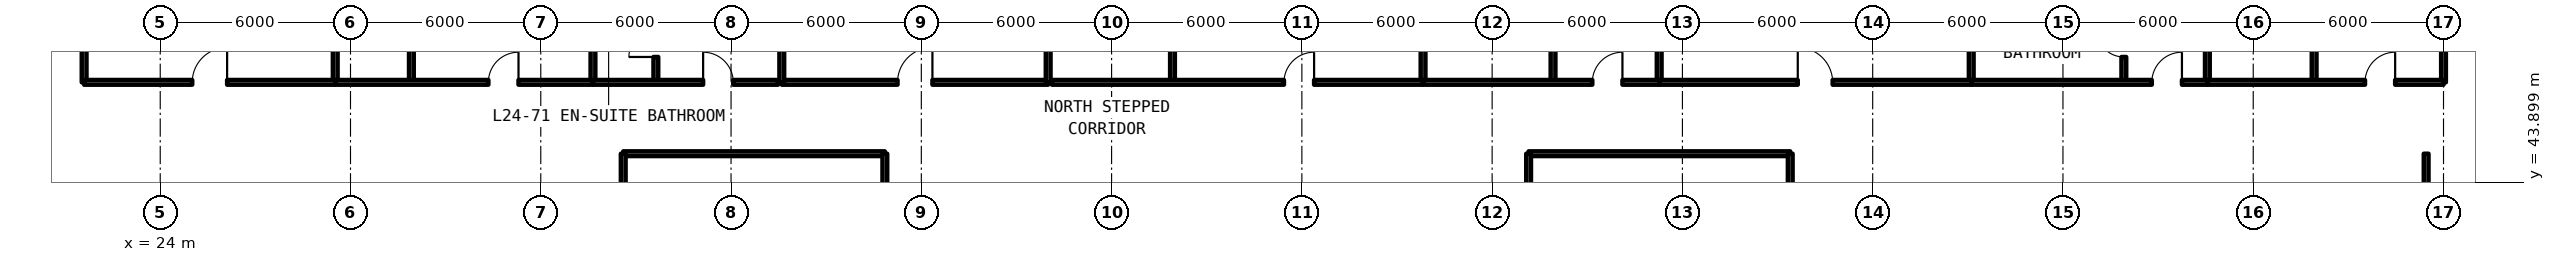
"""IFC4 building model, lengths in metres.
Left out: names, types, materials, properties, quantities, classifications, styles, units other than length and angle.
Written with IfcOpenShell. Run it as: python <this file> out.ifc"""

import sys

from ifc_helpers import new_model, si_unit, direction, frame, frame_2d, origin, place, context, subcontext, project, spatial, rectangle, extrude, element, fill, save


model = new_model("IFC4")
c1 = context("Model", 3, precision=1e-05, world=origin(), true_north=direction((0.0, 1.0)))
c2 = subcontext(c1, "Body", "Model", "MODEL_VIEW")
j1 = project(units=[si_unit("LENGTHUNIT", "METRE"), si_unit("PLANEANGLEUNIT", "RADIAN")], contexts=[c1])
p1 = place(None, origin())
s1 = spatial("IfcSite", under=j1, at=p1, CompositionType="ELEMENT")
p2 = place(p1, origin())
s2 = spatial("IfcBuilding", under=s1, at=p2, CompositionType="ELEMENT")
p3 = place(p2, frame((0.0, 0.0, 88.77)))
s3 = spatial("IfcBuildingStorey", under=s2, at=p3, CompositionType="ELEMENT", Elevation=88.77)
p4 = place(p3, frame((38.6, 44.8, 0.0), z_axis=(0.0, 0.0, 1.0), x_axis=(1.0, 0.0, 0.0)))
e1 = element("IfcWall", 1, at=p4, inside=s3, PredefinedType="SOLIDWALL", context=c2, shape_type="SweptSolid", body=[
    extrude(rectangle(XDim=8.25, YDim=0.15, at=frame_2d((4.125, 0.0))), origin(), (0.0, 0.0, 1.0), 2.35),
])
p5 = place(p3, frame((38.6, 22.4, 0.0), z_axis=(0.0, 0.0, 1.0), x_axis=(0.0, 1.0, 0.0)))
e2 = element("IfcWall", 2, at=p5, inside=s3, PredefinedType="SOLIDWALL", context=c2, shape_type="SweptSolid", body=[
    extrude(rectangle(XDim=22.4, YDim=0.15, at=frame_2d((11.2, 0.0))), origin(), (0.0, 0.0, 1.0), 2.35),
])
p6 = place(p5, frame((8.025, 0.0, 0.0)))
e3 = element("IfcOpeningElement", 3, at=p6, cuts=e2, PredefinedType="OPENING", context=c2, shape_type="SweptSolid", body=[
    extrude(rectangle(XDim=0.95, YDim=2.15, at=frame_2d((0.475, 1.075))), frame((0.0, 0.085, 0.0), z_axis=(0.0, -1.0, 0.0), x_axis=(1.0, 0.0, 0.0)), (0.0, 0.0, 1.0), 0.17),
])
p7 = place(p3, frame((46.85, 22.4, 0.0), z_axis=(0.0, 0.0, 1.0), x_axis=(0.0, 1.0, 0.0)))
e4 = element("IfcWall", 4, at=p7, inside=s3, PredefinedType="SOLIDWALL", context=c2, shape_type="SweptSolid", body=[
    extrude(rectangle(XDim=22.4, YDim=0.15, at=frame_2d((11.2, 0.0))), origin(), (0.0, 0.0, 1.0), 2.35),
])
p8 = place(p3, frame((67.15, 44.8, 0.0), z_axis=(0.0, 0.0, 1.0), x_axis=(1.0, 0.0, 0.0)))
e5 = element("IfcWall", 5, at=p8, inside=s3, PredefinedType="SOLIDWALL", context=c2, shape_type="SweptSolid", body=[
    extrude(rectangle(XDim=8.25, YDim=0.15, at=frame_2d((4.125, 0.0))), origin(), (0.0, 0.0, 1.0), 2.35),
])
p9 = place(p3, frame((67.15, 22.4, 0.0), z_axis=(0.0, 0.0, 1.0), x_axis=(0.0, 1.0, 0.0)))
e6 = element("IfcWall", 6, at=p9, inside=s3, PredefinedType="SOLIDWALL", context=c2, shape_type="SweptSolid", body=[
    extrude(rectangle(XDim=22.4, YDim=0.15, at=frame_2d((11.2, 0.0))), origin(), (0.0, 0.0, 1.0), 2.35),
])
p10 = place(p3, frame((75.4, 22.4, 0.0), z_axis=(0.0, 0.0, 1.0), x_axis=(0.0, 1.0, 0.0)))
e7 = element("IfcWall", 7, at=p10, inside=s3, PredefinedType="SOLIDWALL", context=c2, shape_type="SweptSolid", body=[
    extrude(rectangle(XDim=22.4, YDim=0.15, at=frame_2d((11.2, 0.0))), origin(), (0.0, 0.0, 1.0), 2.35),
])
p11 = place(p10, frame((8.025, 0.0, 0.0)))
e8 = element("IfcOpeningElement", 8, at=p11, cuts=e7, PredefinedType="OPENING", context=c2, shape_type="SweptSolid", body=[
    extrude(rectangle(XDim=0.95, YDim=2.15, at=frame_2d((0.475, 1.075))), frame((0.0, 0.085, 0.0), z_axis=(0.0, -1.0, 0.0), x_axis=(1.0, 0.0, 0.0)), (0.0, 0.0, 1.0), 0.17),
])
p12 = place(p3, frame((95.452, 39.6, 0.0), z_axis=(0.0, 0.0, 1.0), x_axis=(0.0, 1.0, 0.0)))
e9 = element("IfcWall", 9, at=p12, inside=s3, PredefinedType="PARTITIONING", context=c2, shape_type="SweptSolid", body=[
    extrude(rectangle(XDim=5.2, YDim=0.15, at=frame_2d((2.6, 0.0))), origin(), (0.0, 0.0, 1.0), 2.35),
])
p13 = place(p3, frame((43.6, 47.05, 0.0), z_axis=(0.0, 0.0, 1.0), x_axis=(1.0, 0.0, 0.0)))
e10 = element("IfcWall", 10, at=p13, inside=s3, PredefinedType="SOLIDWALL", context=c2, shape_type="SweptSolid", body=[
    extrude(rectangle(XDim=8.4, YDim=0.15, at=frame_2d((4.2, 0.0))), origin(), (0.0, 0.0, 1.0), 2.35),
])
p14 = place(p13, frame((3.65, 0.0, 0.0)))
e11 = element("IfcOpeningElement", 11, at=p14, cuts=e10, PredefinedType="OPENING", context=c2, shape_type="SweptSolid", body=[
    extrude(rectangle(XDim=1.1, YDim=2.15, at=frame_2d((0.55, 1.075))), frame((0.0, 0.085, 0.0), z_axis=(0.0, -1.0, 0.0), x_axis=(1.0, 0.0, 0.0)), (0.0, 0.0, 1.0), 0.17),
])
for number, where, z_axis, x_axis in (
    (12, (43.6, 47.05, 0.0), (0.0, 0.0, 1.0), (0.0, 1.0, 0.0)),
    (13, (52.0, 47.05, 0.0), (0.0, 0.0, 1.0), (0.0, 1.0, 0.0)),
    (14, (21.6, 47.05, 0.0), (0.0, 0.0, 1.0), (0.0, 1.0, 0.0)),
    (15, (29.519, 47.05, 0.0), (0.0, 0.0, 1.0), (0.0, 1.0, 0.0)),
):
    element("IfcWall", number, at=place(p3, frame(where, z_axis=z_axis, x_axis=x_axis)), inside=s3, PredefinedType="SOLIDWALL", context=c2, shape_type="SweptSolid", body=[
        extrude(rectangle(XDim=10.3, YDim=0.15, at=frame_2d((5.15, 0.0))), origin(), (0.0, 0.0, 1.0), 2.35),
    ])
p15 = place(p3, frame((21.6, 47.05, 0.0), z_axis=(0.0, 0.0, 1.0), x_axis=(1.0, 0.0, 0.0)))
e16 = element("IfcWall", 16, at=p15, inside=s3, PredefinedType="SOLIDWALL", context=c2, shape_type="SweptSolid", body=[
    extrude(rectangle(XDim=7.918, YDim=0.15, at=frame_2d((3.959, 0.0))), origin(), (0.0, 0.0, 1.0), 2.35),
])
p16 = place(p15, frame((3.409, 0.0, 0.0)))
e17 = element("IfcOpeningElement", 17, at=p16, cuts=e16, PredefinedType="OPENING", context=c2, shape_type="SweptSolid", body=[
    extrude(rectangle(XDim=1.1, YDim=2.15, at=frame_2d((0.55, 1.075))), frame((0.0, 0.085, 0.0), z_axis=(0.0, -1.0, 0.0), x_axis=(1.0, 0.0, 0.0)), (0.0, 0.0, 1.0), 0.17),
])
p17 = place(p3, frame((37.646, 47.05, 0.0), z_axis=(0.0, 0.0, 1.0), x_axis=(0.0, 1.0, 0.0)))
e18 = element("IfcWall", 18, at=p17, inside=s3, PredefinedType="SOLIDWALL", context=c2, shape_type="SweptSolid", body=[
    extrude(rectangle(XDim=10.3, YDim=0.15, at=frame_2d((5.15, 0.0))), origin(), (0.0, 0.0, 1.0), 2.35),
])
p18 = place(p3, frame((31.92, 47.05, 0.0), z_axis=(0.0, 0.0, 1.0), x_axis=(0.0, 1.0, 0.0)))
e19 = element("IfcWall", 19, at=p18, inside=s3, PredefinedType="PARTITIONING", context=c2, shape_type="SweptSolid", body=[
    extrude(rectangle(XDim=6.67, YDim=0.15, at=frame_2d((3.335, 0.0))), origin(), (0.0, 0.0, 1.0), 2.35),
])
p19 = place(p18, frame((1.543, 0.0, 0.0)))
e20 = element("IfcOpeningElement", 20, at=p19, cuts=e19, PredefinedType="OPENING", context=c2, shape_type="SweptSolid", body=[
    extrude(rectangle(XDim=0.85, YDim=2.1, at=frame_2d((0.425, 1.05))), frame((0.0, 0.085, 0.0), z_axis=(0.0, -1.0, 0.0), x_axis=(1.0, 0.0, 0.0)), (0.0, 0.0, 1.0), 0.17),
])
p20 = place(p18, frame((4.878, 0.0, 0.0)))
e21 = element("IfcOpeningElement", 21, at=p20, cuts=e19, PredefinedType="OPENING", context=c2, shape_type="SweptSolid", body=[
    extrude(rectangle(XDim=0.85, YDim=2.1, at=frame_2d((0.425, 1.05))), frame((0.0, 0.085, 0.0), z_axis=(0.0, -1.0, 0.0), x_axis=(1.0, 0.0, 0.0)), (0.0, 0.0, 1.0), 0.17),
])
p21 = place(p3, frame((29.519, 47.05, 0.0), z_axis=(0.0, 0.0, 1.0), x_axis=(1.0, 0.0, 0.0)))
e22 = element("IfcWall", 22, at=p21, inside=s3, PredefinedType="SOLIDWALL", context=c2, shape_type="SweptSolid", body=[
    extrude(rectangle(XDim=8.127, YDim=0.15, at=frame_2d((4.063, 0.0))), origin(), (0.0, 0.0, 1.0), 2.35),
])
p22 = place(p21, frame((4.829, 0.0, 0.0)))
e23 = element("IfcOpeningElement", 23, at=p22, cuts=e22, PredefinedType="OPENING", context=c2, shape_type="SweptSolid", body=[
    extrude(rectangle(XDim=0.95, YDim=2.15, at=frame_2d((0.475, 1.075))), frame((0.0, 0.085, 0.0), z_axis=(0.0, -1.0, 0.0), x_axis=(1.0, 0.0, 0.0)), (0.0, 0.0, 1.0), 0.17),
])
p23 = place(p3, frame((39.629, 47.05, 0.0), z_axis=(0.0, 0.0, 1.0), x_axis=(0.0, 1.0, 0.0)))
e24 = element("IfcWall", 24, at=p23, inside=s3, PredefinedType="PARTITIONING", context=c2, shape_type="SweptSolid", body=[
    extrude(rectangle(XDim=10.3, YDim=0.15, at=frame_2d((5.15, 0.0))), origin(), (0.0, 0.0, 1.0), 2.35),
])
p24 = place(p23, frame((0.8, 0.0, 0.0)))
e25 = element("IfcOpeningElement", 25, at=p24, cuts=e24, PredefinedType="OPENING", context=c2, shape_type="SweptSolid", body=[
    extrude(rectangle(XDim=0.85, YDim=2.1, at=frame_2d((0.425, 1.05))), frame((0.0, 0.085, 0.0), z_axis=(0.0, -1.0, 0.0), x_axis=(1.0, 0.0, 0.0)), (0.0, 0.0, 1.0), 0.17),
])
p25 = place(p23, frame((5.25, 0.0, 0.0)))
e26 = element("IfcOpeningElement", 26, at=p25, cuts=e24, PredefinedType="OPENING", context=c2, shape_type="SweptSolid", body=[
    extrude(rectangle(XDim=0.85, YDim=2.1, at=frame_2d((0.425, 1.05))), frame((0.0, 0.085, 0.0), z_axis=(0.0, -1.0, 0.0), x_axis=(1.0, 0.0, 0.0)), (0.0, 0.0, 1.0), 0.17),
])
p26 = place(p3, frame((37.646, 47.05, 0.0), z_axis=(0.0, 0.0, 1.0), x_axis=(1.0, 0.0, 0.0)))
e27 = element("IfcWall", 27, at=p26, inside=s3, PredefinedType="SOLIDWALL", context=c2, shape_type="SweptSolid", body=[
    extrude(rectangle(XDim=5.834, YDim=0.15, at=frame_2d((2.917, 0.0))), origin(), (0.0, 0.0, 1.0), 2.35),
])
p27 = place(p26, frame((3.474, 0.0, 0.0)))
e28 = element("IfcOpeningElement", 28, at=p27, cuts=e27, PredefinedType="OPENING", context=c2, shape_type="SweptSolid", body=[
    extrude(rectangle(XDim=0.95, YDim=2.15, at=frame_2d((0.475, 1.075))), frame((0.0, 0.085, 0.0), z_axis=(0.0, -1.0, 0.0), x_axis=(1.0, 0.0, 0.0)), (0.0, 0.0, 1.0), 0.17),
])
for number, where, z_axis, x_axis in (
    (29, (96.0, 47.05, 0.0), (0.0, 0.0, 1.0), (0.0, 1.0, 0.0)),
    (30, (63.821, 47.05, 0.0), (0.0, 0.0, 1.0), (0.0, 1.0, 0.0)),
):
    element("IfcWall", number, at=place(p3, frame(where, z_axis=z_axis, x_axis=x_axis)), inside=s3, PredefinedType="SOLIDWALL", context=c2, shape_type="SweptSolid", body=[
        extrude(rectangle(XDim=10.3, YDim=0.15, at=frame_2d((5.15, 0.0))), origin(), (0.0, 0.0, 1.0), 2.35),
    ])
p28 = place(p3, frame((55.92, 47.05, 0.0), z_axis=(0.0, 0.0, 1.0), x_axis=(0.0, 1.0, 0.0)))
e31 = element("IfcWall", 31, at=p28, inside=s3, PredefinedType="PARTITIONING", context=c2, shape_type="SweptSolid", body=[
    extrude(rectangle(XDim=5.452, YDim=0.15, at=frame_2d((2.726, 0.0))), origin(), (0.0, 0.0, 1.0), 2.35),
])
p29 = place(p28, frame((1.183, 0.0, 0.0)))
e32 = element("IfcOpeningElement", 32, at=p29, cuts=e31, PredefinedType="OPENING", context=c2, shape_type="SweptSolid", body=[
    extrude(rectangle(XDim=0.85, YDim=2.1, at=frame_2d((0.425, 1.05))), frame((0.0, 0.085, 0.0), z_axis=(0.0, -1.0, 0.0), x_axis=(1.0, 0.0, 0.0)), (0.0, 0.0, 1.0), 0.17),
])
p30 = place(p28, frame((3.909, 0.0, 0.0)))
e33 = element("IfcOpeningElement", 33, at=p30, cuts=e31, PredefinedType="OPENING", context=c2, shape_type="SweptSolid", body=[
    extrude(rectangle(XDim=0.85, YDim=2.1, at=frame_2d((0.425, 1.05))), frame((0.0, 0.085, 0.0), z_axis=(0.0, -1.0, 0.0), x_axis=(1.0, 0.0, 0.0)), (0.0, 0.0, 1.0), 0.17),
])
p31 = place(p3, frame((52.12, 47.05, 0.0), z_axis=(0.0, 0.0, 1.0), x_axis=(1.0, 0.0, 0.0)))
e34 = element("IfcWall", 34, at=p31, inside=s3, PredefinedType="SOLIDWALL", context=c2, shape_type="SweptSolid", body=[
    extrude(rectangle(XDim=11.701, YDim=0.15, at=frame_2d((5.851, 0.0))), origin(), (0.0, 0.0, 1.0), 2.35),
])
p32 = place(p31, frame((7.316, 0.0, 0.0)))
e35 = element("IfcOpeningElement", 35, at=p32, cuts=e34, PredefinedType="OPENING", context=c2, shape_type="SweptSolid", body=[
    extrude(rectangle(XDim=0.95, YDim=2.15, at=frame_2d((0.475, 1.075))), frame((0.0, 0.085, 0.0), z_axis=(0.0, -1.0, 0.0), x_axis=(1.0, 0.0, 0.0)), (0.0, 0.0, 1.0), 0.17),
])
p33 = place(p3, frame((71.268, 47.05, 0.0), z_axis=(0.0, 0.0, 1.0), x_axis=(0.0, 1.0, 0.0)))
e36 = element("IfcWall", 36, at=p33, inside=s3, PredefinedType="SOLIDWALL", context=c2, shape_type="SweptSolid", body=[
    extrude(rectangle(XDim=10.3, YDim=0.15, at=frame_2d((5.15, 0.0))), origin(), (0.0, 0.0, 1.0), 2.35),
])
p34 = place(p3, frame((67.92, 47.05, 0.0), z_axis=(0.0, 0.0, 1.0), x_axis=(0.0, 1.0, 0.0)))
e37 = element("IfcWall", 37, at=p34, inside=s3, PredefinedType="PARTITIONING", context=c2, shape_type="SweptSolid", body=[
    extrude(rectangle(XDim=6.338, YDim=0.15, at=frame_2d((3.169, 0.0))), origin(), (0.0, 0.0, 1.0), 2.35),
])
p35 = place(p34, frame((1.445, 0.0, 0.0)))
e38 = element("IfcOpeningElement", 38, at=p35, cuts=e37, PredefinedType="OPENING", context=c2, shape_type="SweptSolid", body=[
    extrude(rectangle(XDim=0.85, YDim=2.1, at=frame_2d((0.425, 1.05))), frame((0.0, 0.085, 0.0), z_axis=(0.0, -1.0, 0.0), x_axis=(1.0, 0.0, 0.0)), (0.0, 0.0, 1.0), 0.17),
])
p36 = place(p34, frame((4.614, 0.0, 0.0)))
e39 = element("IfcOpeningElement", 39, at=p36, cuts=e37, PredefinedType="OPENING", context=c2, shape_type="SweptSolid", body=[
    extrude(rectangle(XDim=0.85, YDim=2.1, at=frame_2d((0.425, 1.05))), frame((0.0, 0.085, 0.0), z_axis=(0.0, -1.0, 0.0), x_axis=(1.0, 0.0, 0.0)), (0.0, 0.0, 1.0), 0.17),
])
p37 = place(p3, frame((63.821, 47.05, 0.0), z_axis=(0.0, 0.0, 1.0), x_axis=(1.0, 0.0, 0.0)))
e40 = element("IfcWall", 40, at=p37, inside=s3, PredefinedType="SOLIDWALL", context=c2, shape_type="SweptSolid", body=[
    extrude(rectangle(XDim=7.446, YDim=0.15, at=frame_2d((3.723, 0.0))), origin(), (0.0, 0.0, 1.0), 2.35),
])
p38 = place(p37, frame((5.337, 0.0, 0.0)))
e41 = element("IfcOpeningElement", 41, at=p38, cuts=e40, PredefinedType="OPENING", context=c2, shape_type="SweptSolid", body=[
    extrude(rectangle(XDim=0.95, YDim=2.15, at=frame_2d((0.475, 1.075))), frame((0.0, 0.085, 0.0), z_axis=(0.0, -1.0, 0.0), x_axis=(1.0, 0.0, 0.0)), (0.0, 0.0, 1.0), 0.17),
])
p39 = place(p3, frame((81.107, 47.05, 0.0), z_axis=(0.0, 0.0, 1.0), x_axis=(0.0, 1.0, 0.0)))
e42 = element("IfcWall", 42, at=p39, inside=s3, PredefinedType="SOLIDWALL", context=c2, shape_type="SweptSolid", body=[
    extrude(rectangle(XDim=10.3, YDim=0.15, at=frame_2d((5.15, 0.0))), origin(), (0.0, 0.0, 1.0), 2.35),
])
p40 = place(p3, frame((71.268, 47.05, 0.0), z_axis=(0.0, 0.0, 1.0), x_axis=(1.0, 0.0, 0.0)))
e43 = element("IfcWall", 43, at=p40, inside=s3, PredefinedType="SOLIDWALL", context=c2, shape_type="SweptSolid", body=[
    extrude(rectangle(XDim=9.84, YDim=0.15, at=frame_2d((4.92, 0.0))), origin(), (0.0, 0.0, 1.0), 2.35),
])
p41 = place(p40, frame((4.37, 0.0, 0.0)))
e44 = element("IfcOpeningElement", 44, at=p41, cuts=e43, PredefinedType="OPENING", context=c2, shape_type="SweptSolid", body=[
    extrude(rectangle(XDim=1.1, YDim=2.15, at=frame_2d((0.55, 1.075))), frame((0.0, 0.085, 0.0), z_axis=(0.0, -1.0, 0.0), x_axis=(1.0, 0.0, 0.0)), (0.0, 0.0, 1.0), 0.17),
])
p42 = place(p3, frame((88.554, 47.05, 0.0), z_axis=(0.0, 0.0, 1.0), x_axis=(0.0, 1.0, 0.0)))
e45 = element("IfcWall", 45, at=p42, inside=s3, PredefinedType="SOLIDWALL", context=c2, shape_type="SweptSolid", body=[
    extrude(rectangle(XDim=10.3, YDim=0.15, at=frame_2d((5.15, 0.0))), origin(), (0.0, 0.0, 1.0), 2.35),
])
p43 = place(p3, frame((85.92, 47.05, 0.0), z_axis=(0.0, 0.0, 1.0), x_axis=(0.0, 1.0, 0.0)))
e46 = element("IfcWall", 46, at=p43, inside=s3, PredefinedType="PARTITIONING", context=c2, shape_type="SweptSolid", body=[
    extrude(rectangle(XDim=10.3, YDim=0.15, at=frame_2d((5.15, 0.0))), origin(), (0.0, 0.0, 1.0), 2.35),
])
p44 = place(p43, frame((0.8, 0.0, 0.0)))
e47 = element("IfcOpeningElement", 47, at=p44, cuts=e46, PredefinedType="OPENING", context=c2, shape_type="SweptSolid", body=[
    extrude(rectangle(XDim=0.85, YDim=2.1, at=frame_2d((0.425, 1.05))), frame((0.0, 0.085, 0.0), z_axis=(0.0, -1.0, 0.0), x_axis=(1.0, 0.0, 0.0)), (0.0, 0.0, 1.0), 0.17),
])
p45 = place(p43, frame((5.25, 0.0, 0.0)))
e48 = element("IfcOpeningElement", 48, at=p45, cuts=e46, PredefinedType="OPENING", context=c2, shape_type="SweptSolid", body=[
    extrude(rectangle(XDim=0.85, YDim=2.1, at=frame_2d((0.425, 1.05))), frame((0.0, 0.085, 0.0), z_axis=(0.0, -1.0, 0.0), x_axis=(1.0, 0.0, 0.0)), (0.0, 0.0, 1.0), 0.17),
])
p46 = place(p3, frame((81.107, 47.05, 0.0), z_axis=(0.0, 0.0, 1.0), x_axis=(1.0, 0.0, 0.0)))
e49 = element("IfcWall", 49, at=p46, inside=s3, PredefinedType="SOLIDWALL", context=c2, shape_type="SweptSolid", body=[
    extrude(rectangle(XDim=7.446, YDim=0.15, at=frame_2d((3.723, 0.0))), origin(), (0.0, 0.0, 1.0), 2.35),
])
p47 = place(p46, frame((5.694, 0.0, 0.0)))
e50 = element("IfcOpeningElement", 50, at=p47, cuts=e49, PredefinedType="OPENING", context=c2, shape_type="SweptSolid", body=[
    extrude(rectangle(XDim=0.95, YDim=2.15, at=frame_2d((0.475, 1.075))), frame((0.0, 0.085, 0.0), z_axis=(0.0, -1.0, 0.0), x_axis=(1.0, 0.0, 0.0)), (0.0, 0.0, 1.0), 0.17),
])
p48 = place(p3, frame((91.92, 47.05, 0.0), z_axis=(0.0, 0.0, 1.0), x_axis=(0.0, 1.0, 0.0)))
e51 = element("IfcWall", 51, at=p48, inside=s3, PredefinedType="PARTITIONING", context=c2, shape_type="SweptSolid", body=[
    extrude(rectangle(XDim=6.338, YDim=0.15, at=frame_2d((3.169, 0.0))), origin(), (0.0, 0.0, 1.0), 2.35),
])
p49 = place(p48, frame((1.445, 0.0, 0.0)))
e52 = element("IfcOpeningElement", 52, at=p49, cuts=e51, PredefinedType="OPENING", context=c2, shape_type="SweptSolid", body=[
    extrude(rectangle(XDim=0.85, YDim=2.1, at=frame_2d((0.425, 1.05))), frame((0.0, 0.085, 0.0), z_axis=(0.0, -1.0, 0.0), x_axis=(1.0, 0.0, 0.0)), (0.0, 0.0, 1.0), 0.17),
])
p50 = place(p48, frame((4.614, 0.0, 0.0)))
e53 = element("IfcOpeningElement", 53, at=p50, cuts=e51, PredefinedType="OPENING", context=c2, shape_type="SweptSolid", body=[
    extrude(rectangle(XDim=0.85, YDim=2.1, at=frame_2d((0.425, 1.05))), frame((0.0, 0.085, 0.0), z_axis=(0.0, -1.0, 0.0), x_axis=(1.0, 0.0, 0.0)), (0.0, 0.0, 1.0), 0.17),
])
p51 = place(p3, frame((88.554, 47.05, 0.0), z_axis=(0.0, 0.0, 1.0), x_axis=(1.0, 0.0, 0.0)))
e54 = element("IfcWall", 54, at=p51, inside=s3, PredefinedType="SOLIDWALL", context=c2, shape_type="SweptSolid", body=[
    extrude(rectangle(XDim=7.446, YDim=0.15, at=frame_2d((3.723, 0.0))), origin(), (0.0, 0.0, 1.0), 2.35),
])
p52 = place(p51, frame((4.971, 0.0, 0.0)))
e55 = element("IfcOpeningElement", 55, at=p52, cuts=e54, PredefinedType="OPENING", context=c2, shape_type="SweptSolid", body=[
    extrude(rectangle(XDim=0.95, YDim=2.15, at=frame_2d((0.475, 1.075))), frame((0.0, 0.085, 0.0), z_axis=(0.0, -1.0, 0.0), x_axis=(1.0, 0.0, 0.0)), (0.0, 0.0, 1.0), 0.17),
])
p53 = place(p14, origin())
e56 = element("IfcDoor", 56, at=p53, inside=s3, OperationType="SINGLE_SWING_RIGHT", PredefinedType="DOOR", context=c2, shape_type="SweptSolid", body=[
    extrude(rectangle(XDim=1.1, YDim=2.15, at=frame_2d((0.55, 1.075))), frame((0.0, 0.025, 0.0), z_axis=(0.0, -1.0, 0.0), x_axis=(1.0, 0.0, 0.0)), (0.0, 0.0, 1.0), 0.05),
])
fill(e11, e56)
p54 = place(p16, origin())
e57 = element("IfcDoor", 57, at=p54, inside=s3, OperationType="SINGLE_SWING_RIGHT", PredefinedType="DOOR", context=c2, shape_type="SweptSolid", body=[
    extrude(rectangle(XDim=1.1, YDim=2.15, at=frame_2d((0.55, 1.075))), frame((0.0, 0.025, 0.0), z_axis=(0.0, -1.0, 0.0), x_axis=(1.0, 0.0, 0.0)), (0.0, 0.0, 1.0), 0.05),
])
fill(e17, e57)
p55 = place(p22, origin())
e58 = element("IfcDoor", 58, at=p55, inside=s3, OperationType="SINGLE_SWING_RIGHT", PredefinedType="DOOR", context=c2, shape_type="SweptSolid", body=[
    extrude(rectangle(XDim=0.95, YDim=2.15, at=frame_2d((0.475, 1.075))), frame((0.0, 0.025, 0.0), z_axis=(0.0, -1.0, 0.0), x_axis=(1.0, 0.0, 0.0)), (0.0, 0.0, 1.0), 0.05),
])
fill(e23, e58)
p56 = place(p24, origin())
e59 = element("IfcDoor", 59, at=p56, inside=s3, OperationType="SINGLE_SWING_LEFT", PredefinedType="DOOR", context=c2, shape_type="SweptSolid", body=[
    extrude(rectangle(XDim=0.85, YDim=2.1, at=frame_2d((0.425, 1.05))), frame((0.0, 0.025, 0.0), z_axis=(0.0, -1.0, 0.0), x_axis=(1.0, 0.0, 0.0)), (0.0, 0.0, 1.0), 0.05),
])
fill(e25, e59)
p57 = place(p27, origin())
e60 = element("IfcDoor", 60, at=p57, inside=s3, OperationType="SINGLE_SWING_LEFT", PredefinedType="DOOR", context=c2, shape_type="SweptSolid", body=[
    extrude(rectangle(XDim=0.95, YDim=2.15, at=frame_2d((0.475, 1.075))), frame((0.0, 0.025, 0.0), z_axis=(0.0, -1.0, 0.0), x_axis=(1.0, 0.0, 0.0)), (0.0, 0.0, 1.0), 0.05),
])
fill(e28, e60)
p58 = place(p32, origin())
e61 = element("IfcDoor", 61, at=p58, inside=s3, OperationType="SINGLE_SWING_RIGHT", PredefinedType="DOOR", context=c2, shape_type="SweptSolid", body=[
    extrude(rectangle(XDim=0.95, YDim=2.15, at=frame_2d((0.475, 1.075))), frame((0.0, 0.025, 0.0), z_axis=(0.0, -1.0, 0.0), x_axis=(1.0, 0.0, 0.0)), (0.0, 0.0, 1.0), 0.05),
])
fill(e35, e61)
p59 = place(p38, origin())
e62 = element("IfcDoor", 62, at=p59, inside=s3, OperationType="SINGLE_SWING_RIGHT", PredefinedType="DOOR", context=c2, shape_type="SweptSolid", body=[
    extrude(rectangle(XDim=0.95, YDim=2.15, at=frame_2d((0.475, 1.075))), frame((0.0, 0.025, 0.0), z_axis=(0.0, -1.0, 0.0), x_axis=(1.0, 0.0, 0.0)), (0.0, 0.0, 1.0), 0.05),
])
fill(e41, e62)
p60 = place(p41, origin())
e63 = element("IfcDoor", 63, at=p60, inside=s3, OperationType="SINGLE_SWING_LEFT", PredefinedType="DOOR", context=c2, shape_type="SweptSolid", body=[
    extrude(rectangle(XDim=1.1, YDim=2.15, at=frame_2d((0.55, 1.075))), frame((0.0, 0.025, 0.0), z_axis=(0.0, -1.0, 0.0), x_axis=(1.0, 0.0, 0.0)), (0.0, 0.0, 1.0), 0.05),
])
fill(e44, e63)
p61 = place(p44, origin())
e64 = element("IfcDoor", 64, at=p61, inside=s3, OperationType="SINGLE_SWING_RIGHT", PredefinedType="DOOR", context=c2, shape_type="SweptSolid", body=[
    extrude(rectangle(XDim=0.85, YDim=2.1, at=frame_2d((0.425, 1.05))), frame((0.0, 0.025, 0.0), z_axis=(0.0, -1.0, 0.0), x_axis=(1.0, 0.0, 0.0)), (0.0, 0.0, 1.0), 0.05),
])
fill(e47, e64)
p62 = place(p47, origin())
e65 = element("IfcDoor", 65, at=p62, inside=s3, OperationType="SINGLE_SWING_RIGHT", PredefinedType="DOOR", context=c2, shape_type="SweptSolid", body=[
    extrude(rectangle(XDim=0.95, YDim=2.15, at=frame_2d((0.475, 1.075))), frame((0.0, 0.025, 0.0), z_axis=(0.0, -1.0, 0.0), x_axis=(1.0, 0.0, 0.0)), (0.0, 0.0, 1.0), 0.05),
])
fill(e50, e65)
p63 = place(p52, origin())
e66 = element("IfcDoor", 66, at=p63, inside=s3, OperationType="SINGLE_SWING_RIGHT", PredefinedType="DOOR", context=c2, shape_type="SweptSolid", body=[
    extrude(rectangle(XDim=0.95, YDim=2.15, at=frame_2d((0.475, 1.075))), frame((0.0, 0.025, 0.0), z_axis=(0.0, -1.0, 0.0), x_axis=(1.0, 0.0, 0.0)), (0.0, 0.0, 1.0), 0.05),
])
fill(e55, e66)
save(model, sys.argv[1])
